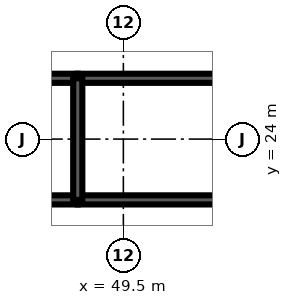
"""IFC4 building model, lengths in metres.
Left out: names, types, materials, properties, quantities, classifications, styles, units other than length and angle.
Written with IfcOpenShell. Run it as: python <this file> out.ifc"""

import sys

from ifc_helpers import new_model, si_unit, direction, frame, frame_2d, origin, place, context, subcontext, project, spatial, rectangle, extrude, element, fill, save


model = new_model("IFC4")
c1 = context("Model", 3, precision=1e-05, world=origin(), true_north=direction((0.0, 1.0)))
c2 = subcontext(c1, "Body", "Model", "MODEL_VIEW")
j1 = project(units=[si_unit("LENGTHUNIT", "METRE"), si_unit("PLANEANGLEUNIT", "RADIAN")], contexts=[c1])
p1 = place(None, origin())
s1 = spatial("IfcSite", under=j1, at=p1, CompositionType="ELEMENT")
p2 = place(p1, origin())
s2 = spatial("IfcBuilding", under=s1, at=p2, CompositionType="ELEMENT")
p3 = place(p2, frame((0.0, 0.0, 321.5)))
s3 = spatial("IfcBuildingStorey", under=s2, at=p3, CompositionType="ELEMENT", Elevation=321.5)
p4 = place(p3, frame((45.0, 22.0, 0.0), z_axis=(0.0, 0.0, 1.0), x_axis=(1.0, 0.0, 0.0)))
e1 = element("IfcWall", 1, at=p4, inside=s3, PredefinedType="SOLIDWALL", context=c2, shape_type="SweptSolid", body=[
    extrude(rectangle(XDim=3.0, YDim=0.3, at=frame_2d((1.5, 0.0))), origin(), (0.0, 0.0, 1.0), 4.2),
])
p5 = place(p4, frame((1.0, 0.0, 0.0)))
e2 = element("IfcOpeningElement", 2, at=p5, cuts=e1, PredefinedType="OPENING", context=c2, shape_type="SweptSolid", body=[
    extrude(rectangle(XDim=1.0, YDim=2.1, at=frame_2d((0.5, 1.05))), frame((0.0, 0.16, 0.0), z_axis=(0.0, -1.0, 0.0), x_axis=(1.0, 0.0, 0.0)), (0.0, 0.0, 1.0), 0.32),
])
p6 = place(p3, frame((48.0, 22.0, 0.0), z_axis=(0.0, 0.0, 1.0), x_axis=(1.0, 0.0, 0.0)))
e3 = element("IfcWall", 3, at=p6, inside=s3, PredefinedType="SOLIDWALL", context=c2, shape_type="SweptSolid", body=[
    extrude(rectangle(XDim=6.0, YDim=0.3, at=frame_2d((3.0, 0.0))), origin(), (0.0, 0.0, 1.0), 4.2),
])
p7 = place(p6, frame((2.0, 0.0, 0.0)))
e4 = element("IfcOpeningElement", 4, at=p7, cuts=e3, PredefinedType="OPENING", context=c2, shape_type="SweptSolid", body=[
    extrude(rectangle(XDim=1.0, YDim=2.1, at=frame_2d((0.5, 1.05))), frame((0.0, 0.16, 0.0), z_axis=(0.0, -1.0, 0.0), x_axis=(1.0, 0.0, 0.0)), (0.0, 0.0, 1.0), 0.32),
])
p8 = place(p6, frame((4.1, 0.0, 0.0)))
e5 = element("IfcOpeningElement", 5, at=p8, cuts=e3, PredefinedType="OPENING", context=c2, shape_type="SweptSolid", body=[
    extrude(rectangle(XDim=1.0, YDim=2.1, at=frame_2d((0.5, 1.05))), frame((0.0, 0.16, 0.0), z_axis=(0.0, -1.0, 0.0), x_axis=(1.0, 0.0, 0.0)), (0.0, 0.0, 1.0), 0.32),
])
p9 = place(p3, frame((45.0, 26.0, 0.0), z_axis=(0.0, 0.0, 1.0), x_axis=(1.0, 0.0, 0.0)))
e6 = element("IfcWall", 6, at=p9, inside=s3, PredefinedType="SOLIDWALL", context=c2, shape_type="SweptSolid", body=[
    extrude(rectangle(XDim=3.0, YDim=0.3, at=frame_2d((1.5, 0.0))), origin(), (0.0, 0.0, 1.0), 4.2),
])
p10 = place(p3, frame((48.0, 26.0, 0.0), z_axis=(0.0, 0.0, 1.0), x_axis=(1.0, 0.0, 0.0)))
e7 = element("IfcWall", 7, at=p10, inside=s3, PredefinedType="SOLIDWALL", context=c2, shape_type="SweptSolid", body=[
    extrude(rectangle(XDim=6.0, YDim=0.3, at=frame_2d((3.0, 0.0))), origin(), (0.0, 0.0, 1.0), 4.2),
])
p11 = place(p3, frame((48.0, 22.0, 0.0), z_axis=(0.0, 0.0, 1.0), x_axis=(0.0, 1.0, 0.0)))
e8 = element("IfcWall", 8, at=p11, inside=s3, PredefinedType="SOLIDWALL", context=c2, shape_type="SweptSolid", body=[
    extrude(rectangle(XDim=4.0, YDim=0.3, at=frame_2d((2.0, 0.0))), origin(), (0.0, 0.0, 1.0), 4.2),
])
p12 = place(p3, frame((51.475, 22.15, 0.0), z_axis=(0.0, 0.0, 1.0), x_axis=(0.0, 1.0, 0.0)))
e9 = element("IfcWall", 9, at=p12, inside=s3, PredefinedType="PARTITIONING", context=c2, shape_type="SweptSolid", body=[
    extrude(rectangle(XDim=3.7, YDim=0.15, at=frame_2d((1.85, 0.0))), origin(), (0.0, 0.0, 1.0), 3.0),
])
p13 = place(p3, frame((49.2, 26.15, 0.0), z_axis=(0.0, 0.0, 1.0), x_axis=(0.0, 1.0, 0.0)))
e10 = element("IfcWall", 10, at=p13, inside=s3, PredefinedType="PARTITIONING", context=c2, shape_type="SweptSolid", body=[
    extrude(rectangle(XDim=2.5, YDim=0.15, at=frame_2d((1.25, 0.0))), origin(), (0.0, 0.0, 1.0), 3.0),
])
p14 = place(p13, frame((1.15, 0.0, 0.0)))
e11 = element("IfcOpeningElement", 11, at=p14, cuts=e10, PredefinedType="OPENING", context=c2, shape_type="SweptSolid", body=[
    extrude(rectangle(XDim=1.0, YDim=2.1, at=frame_2d((0.5, 1.05))), frame((0.0, 0.085, 0.0), z_axis=(0.0, -1.0, 0.0), x_axis=(1.0, 0.0, 0.0)), (0.0, 0.0, 1.0), 0.17),
])
p15 = place(p7, origin())
e12 = element("IfcDoor", 12, at=p15, inside=s3, OperationType="SINGLE_SWING_LEFT", PredefinedType="DOOR", context=c2, shape_type="SweptSolid", body=[
    extrude(rectangle(XDim=1.0, YDim=2.1, at=frame_2d((0.5, 1.05))), frame((0.0, 0.025, 0.0), z_axis=(0.0, -1.0, 0.0), x_axis=(1.0, 0.0, 0.0)), (0.0, 0.0, 1.0), 0.05),
])
fill(e4, e12)
p16 = place(p8, origin())
e13 = element("IfcDoor", 13, at=p16, inside=s3, OperationType="SINGLE_SWING_RIGHT", PredefinedType="DOOR", context=c2, shape_type="SweptSolid", body=[
    extrude(rectangle(XDim=1.0, YDim=2.1, at=frame_2d((0.5, 1.05))), frame((0.0, 0.025, 0.0), z_axis=(0.0, -1.0, 0.0), x_axis=(1.0, 0.0, 0.0)), (0.0, 0.0, 1.0), 0.05),
])
fill(e5, e13)
save(model, sys.argv[1])
